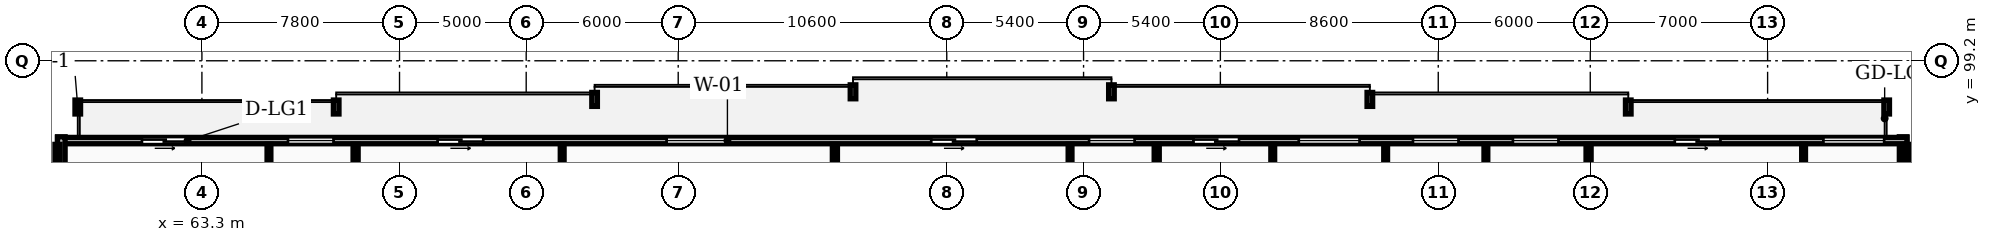
"""IFC4 building model, lengths in metres.
Left out: names, types, materials, properties, quantities, classifications, styles, units other than length and angle.
Written with IfcOpenShell. Run it as: python <this file> out.ifc"""

import sys

from ifc_helpers import new_model, si_unit, direction, frame, frame_2d, origin, place, context, subcontext, project, spatial, rectangle, extrude, element, fill, save


model = new_model("IFC4")
c1 = context("Model", 3, precision=1e-05, world=origin(), true_north=direction((0.0, 1.0)))
c2 = subcontext(c1, "Body", "Model", "MODEL_VIEW")
j1 = project(units=[si_unit("LENGTHUNIT", "METRE"), si_unit("PLANEANGLEUNIT", "RADIAN")], contexts=[c1])
p1 = place(None, origin())
s1 = spatial("IfcSite", under=j1, at=p1, CompositionType="ELEMENT")
p2 = place(p1, origin())
s2 = spatial("IfcBuilding", under=s1, at=p2, CompositionType="ELEMENT")
p3 = place(p2, frame((0.0, 0.0, 80.8)))
s3 = spatial("IfcBuildingStorey", under=s2, at=p3, CompositionType="ELEMENT", Elevation=80.8)
p4 = place(p3, frame((130.45, 92.6, 0.0), z_axis=(0.0, 0.0, 1.0), x_axis=(0.0, 1.0, 0.0)))
e1 = element("IfcWall", 1, at=p4, inside=s3, PredefinedType="STANDARD", context=c2, shape_type="SweptSolid", body=[
    extrude(rectangle(XDim=3.6, YDim=0.3, at=frame_2d((1.8, 0.0))), origin(), (0.0, 0.0, 1.0), 2.97),
])
p5 = place(p3, frame((130.6, 96.05, 0.0), z_axis=(0.0, 0.0, 1.0), x_axis=(-1.0, 0.0, 0.0)))
e2 = element("IfcWall", 2, at=p5, inside=s3, PredefinedType="STANDARD", context=c2, shape_type="SweptSolid", body=[
    extrude(rectangle(XDim=73.0, YDim=0.25, at=frame_2d((36.5, 0.0))), origin(), (0.0, 0.0, 1.0), 2.97),
])
p6 = place(p5, frame((67.867, 0.0, 0.0)))
e3 = element("IfcOpeningElement", 3, at=p6, cuts=e2, PredefinedType="OPENING", context=c2, shape_type="SweptSolid", body=[
    extrude(rectangle(XDim=1.8, YDim=2.2, at=frame_2d((0.9, 1.1))), frame((0.0, 0.135, 0.0), z_axis=(0.0, -1.0, 0.0), x_axis=(1.0, 0.0, 0.0)), (0.0, 0.0, 1.0), 0.27),
])
p7 = place(p5, frame((62.103, 0.0, 0.85)))
e4 = element("IfcOpeningElement", 4, at=p7, cuts=e2, PredefinedType="OPENING", context=c2, shape_type="SweptSolid", body=[
    extrude(rectangle(XDim=1.8, YDim=1.8, at=frame_2d((0.9, 0.9))), frame((0.0, 0.135, 0.0), z_axis=(0.0, -1.0, 0.0), x_axis=(1.0, 0.0, 0.0)), (0.0, 0.0, 1.0), 0.27),
])
p8 = place(p5, frame((56.196, 0.0, 0.0)))
e5 = element("IfcOpeningElement", 5, at=p8, cuts=e2, PredefinedType="OPENING", context=c2, shape_type="SweptSolid", body=[
    extrude(rectangle(XDim=1.8, YDim=2.2, at=frame_2d((0.9, 1.1))), frame((0.0, 0.135, 0.0), z_axis=(0.0, -1.0, 0.0), x_axis=(1.0, 0.0, 0.0)), (0.0, 0.0, 1.0), 0.27),
])
p9 = place(p5, frame((46.557, 0.0, 0.85)))
e6 = element("IfcOpeningElement", 6, at=p9, cuts=e2, PredefinedType="OPENING", context=c2, shape_type="SweptSolid", body=[
    extrude(rectangle(XDim=2.4, YDim=1.9, at=frame_2d((1.2, 0.95))), frame((0.0, 0.135, 0.0), z_axis=(0.0, -1.0, 0.0), x_axis=(1.0, 0.0, 0.0)), (0.0, 0.0, 1.0), 0.27),
])
p10 = place(p5, frame((36.714, 0.0, 0.0)))
e7 = element("IfcOpeningElement", 7, at=p10, cuts=e2, PredefinedType="OPENING", context=c2, shape_type="SweptSolid", body=[
    extrude(rectangle(XDim=1.8, YDim=2.2, at=frame_2d((0.9, 1.1))), frame((0.0, 0.135, 0.0), z_axis=(0.0, -1.0, 0.0), x_axis=(1.0, 0.0, 0.0)), (0.0, 0.0, 1.0), 0.27),
])
p11 = place(p5, frame((30.483, 0.0, 0.85)))
e8 = element("IfcOpeningElement", 8, at=p11, cuts=e2, PredefinedType="OPENING", context=c2, shape_type="SweptSolid", body=[
    extrude(rectangle(XDim=1.8, YDim=1.8, at=frame_2d((0.9, 0.9))), frame((0.0, 0.135, 0.0), z_axis=(0.0, -1.0, 0.0), x_axis=(1.0, 0.0, 0.0)), (0.0, 0.0, 1.0), 0.27),
])
p12 = place(p5, frame((21.604, 0.0, 0.85)))
e9 = element("IfcOpeningElement", 9, at=p12, cuts=e2, PredefinedType="OPENING", context=c2, shape_type="SweptSolid", body=[
    extrude(rectangle(XDim=2.4, YDim=1.9, at=frame_2d((1.2, 0.95))), frame((0.0, 0.135, 0.0), z_axis=(0.0, -1.0, 0.0), x_axis=(1.0, 0.0, 0.0)), (0.0, 0.0, 1.0), 0.27),
])
p13 = place(p5, frame((17.698, 0.0, 0.85)))
e10 = element("IfcOpeningElement", 10, at=p13, cuts=e2, PredefinedType="OPENING", context=c2, shape_type="SweptSolid", body=[
    extrude(rectangle(XDim=1.8, YDim=1.8, at=frame_2d((0.9, 0.9))), frame((0.0, 0.135, 0.0), z_axis=(0.0, -1.0, 0.0), x_axis=(1.0, 0.0, 0.0)), (0.0, 0.0, 1.0), 0.27),
])
p14 = place(p5, frame((26.363, 0.0, 0.0)))
e11 = element("IfcOpeningElement", 11, at=p14, cuts=e2, PredefinedType="OPENING", context=c2, shape_type="SweptSolid", body=[
    extrude(rectangle(XDim=1.8, YDim=2.2, at=frame_2d((0.9, 1.1))), frame((0.0, 0.135, 0.0), z_axis=(0.0, -1.0, 0.0), x_axis=(1.0, 0.0, 0.0)), (0.0, 0.0, 1.0), 0.27),
])
p15 = place(p5, frame((13.753, 0.0, 0.85)))
e12 = element("IfcOpeningElement", 12, at=p15, cuts=e2, PredefinedType="OPENING", context=c2, shape_type="SweptSolid", body=[
    extrude(rectangle(XDim=1.8, YDim=1.8, at=frame_2d((0.9, 0.9))), frame((0.0, 0.135, 0.0), z_axis=(0.0, -1.0, 0.0), x_axis=(1.0, 0.0, 0.0)), (0.0, 0.0, 1.0), 0.27),
])
p16 = place(p5, frame((7.363, 0.0, 0.0)))
e13 = element("IfcOpeningElement", 13, at=p16, cuts=e2, PredefinedType="OPENING", context=c2, shape_type="SweptSolid", body=[
    extrude(rectangle(XDim=1.8, YDim=2.2, at=frame_2d((0.9, 1.1))), frame((0.0, 0.135, 0.0), z_axis=(0.0, -1.0, 0.0), x_axis=(1.0, 0.0, 0.0)), (0.0, 0.0, 1.0), 0.27),
])
p17 = place(p5, frame((0.9, 0.0, 0.85)))
e14 = element("IfcOpeningElement", 14, at=p17, cuts=e2, PredefinedType="OPENING", context=c2, shape_type="SweptSolid", body=[
    extrude(rectangle(XDim=2.4, YDim=1.9, at=frame_2d((1.2, 0.95))), frame((0.0, 0.135, 0.0), z_axis=(0.0, -1.0, 0.0), x_axis=(1.0, 0.0, 0.0)), (0.0, 0.0, 1.0), 0.27),
])
p18 = place(p3, frame((57.75, 96.2, 0.0), z_axis=(0.0, 0.0, 1.0), x_axis=(0.0, -1.0, 0.0)))
e15 = element("IfcWall", 15, at=p18, inside=s3, PredefinedType="STANDARD", context=c2, shape_type="SweptSolid", body=[
    extrude(rectangle(XDim=3.6, YDim=0.3, at=frame_2d((1.8, 0.0))), origin(), (0.0, 0.0, 1.0), 2.97),
])
for number, where, z_axis, x_axis in (
    (16, (57.6, 69.43, 0.0), (0.0, 0.0, 1.0), (0.0, 1.0, 0.0)),
    (17, (130.6, 69.43, 0.0), (0.0, 0.0, 1.0), (0.0, 1.0, 0.0)),
    (18, (69.367, 69.43, 0.0), (0.0, 0.0, 1.0), (0.0, 1.0, 0.0)),
):
    element("IfcWall", number, at=place(p3, frame(where, z_axis=z_axis, x_axis=x_axis)), inside=s3, PredefinedType="PARTITIONING", context=c2, shape_type="SweptSolid", body=[
        extrude(rectangle(XDim=26.47, YDim=0.2, at=frame_2d((13.235, 0.0))), origin(), (0.0, 0.0, 1.0), 2.97),
    ])
p19 = place(p3, frame((65.947, 85.59, 0.0), z_axis=(0.0, 0.0, 1.0), x_axis=(0.0, 1.0, 0.0)))
e19 = element("IfcWall", 19, at=p19, inside=s3, PredefinedType="PARTITIONING", context=c2, shape_type="SweptSolid", body=[
    extrude(rectangle(XDim=10.31, YDim=0.15, at=frame_2d((5.155, 0.0))), origin(), (0.0, 0.0, 1.0), 2.97),
])
p20 = place(p19, frame((1.43, 0.0, 0.0)))
e20 = element("IfcOpeningElement", 20, at=p20, cuts=e19, PredefinedType="OPENING", context=c2, shape_type="SweptSolid", body=[
    extrude(rectangle(XDim=0.84, YDim=2.04, at=frame_2d((0.42, 1.02))), frame((0.0, 0.085, 0.0), z_axis=(0.0, -1.0, 0.0), x_axis=(1.0, 0.0, 0.0)), (0.0, 0.0, 1.0), 0.17),
])
p21 = place(p19, frame((3.102, 0.0, 0.0)))
e21 = element("IfcOpeningElement", 21, at=p21, cuts=e19, PredefinedType="OPENING", context=c2, shape_type="SweptSolid", body=[
    extrude(rectangle(XDim=0.84, YDim=2.04, at=frame_2d((0.42, 1.02))), frame((0.0, 0.085, 0.0), z_axis=(0.0, -1.0, 0.0), x_axis=(1.0, 0.0, 0.0)), (0.0, 0.0, 1.0), 0.17),
])
p22 = place(p19, frame((7.29, 0.0, 0.0)))
e22 = element("IfcOpeningElement", 22, at=p22, cuts=e19, PredefinedType="OPENING", context=c2, shape_type="SweptSolid", body=[
    extrude(rectangle(XDim=0.88, YDim=2.06, at=frame_2d((0.44, 1.03))), frame((0.0, 0.085, 0.0), z_axis=(0.0, -1.0, 0.0), x_axis=(1.0, 0.0, 0.0)), (0.0, 0.0, 1.0), 0.17),
])
p23 = place(p3, frame((88.285, 69.43, 0.0), z_axis=(0.0, 0.0, 1.0), x_axis=(0.0, 1.0, 0.0)))
e23 = element("IfcWall", 23, at=p23, inside=s3, PredefinedType="PARTITIONING", context=c2, shape_type="SweptSolid", body=[
    extrude(rectangle(XDim=26.47, YDim=0.2, at=frame_2d((13.235, 0.0))), origin(), (0.0, 0.0, 1.0), 2.97),
])
p24 = place(p3, frame((77.521, 90.73, 0.0), z_axis=(0.0, 0.0, 1.0), x_axis=(0.0, 1.0, 0.0)))
e24 = element("IfcWall", 24, at=p24, inside=s3, PredefinedType="PARTITIONING", context=c2, shape_type="SweptSolid", body=[
    extrude(rectangle(XDim=5.17, YDim=0.15, at=frame_2d((2.585, 0.0))), origin(), (0.0, 0.0, 1.0), 2.97),
])
p25 = place(p3, frame((100.987, 69.43, 0.0), z_axis=(0.0, 0.0, 1.0), x_axis=(0.0, 1.0, 0.0)))
e25 = element("IfcWall", 25, at=p25, inside=s3, PredefinedType="PARTITIONING", context=c2, shape_type="SweptSolid", body=[
    extrude(rectangle(XDim=26.47, YDim=0.2, at=frame_2d((13.235, 0.0))), origin(), (0.0, 0.0, 1.0), 2.97),
])
p26 = place(p3, frame((97.567, 85.59, 0.0), z_axis=(0.0, 0.0, 1.0), x_axis=(0.0, 1.0, 0.0)))
e26 = element("IfcWall", 26, at=p26, inside=s3, PredefinedType="PARTITIONING", context=c2, shape_type="SweptSolid", body=[
    extrude(rectangle(XDim=10.31, YDim=0.15, at=frame_2d((5.155, 0.0))), origin(), (0.0, 0.0, 1.0), 2.97),
])
p27 = place(p26, frame((1.43, 0.0, 0.0)))
e27 = element("IfcOpeningElement", 27, at=p27, cuts=e26, PredefinedType="OPENING", context=c2, shape_type="SweptSolid", body=[
    extrude(rectangle(XDim=0.84, YDim=2.04, at=frame_2d((0.42, 1.02))), frame((0.0, 0.085, 0.0), z_axis=(0.0, -1.0, 0.0), x_axis=(1.0, 0.0, 0.0)), (0.0, 0.0, 1.0), 0.17),
])
p28 = place(p26, frame((3.92, 0.0, 0.0)))
e28 = element("IfcOpeningElement", 28, at=p28, cuts=e26, PredefinedType="OPENING", context=c2, shape_type="SweptSolid", body=[
    extrude(rectangle(XDim=0.84, YDim=2.04, at=frame_2d((0.42, 1.02))), frame((0.0, 0.085, 0.0), z_axis=(0.0, -1.0, 0.0), x_axis=(1.0, 0.0, 0.0)), (0.0, 0.0, 1.0), 0.17),
])
p29 = place(p26, frame((5.48, 0.0, 0.0)))
e29 = element("IfcOpeningElement", 29, at=p29, cuts=e26, PredefinedType="OPENING", context=c2, shape_type="SweptSolid", body=[
    extrude(rectangle(XDim=0.88, YDim=2.06, at=frame_2d((0.44, 1.03))), frame((0.0, 0.085, 0.0), z_axis=(0.0, -1.0, 0.0), x_axis=(1.0, 0.0, 0.0)), (0.0, 0.0, 1.0), 0.17),
])
p30 = place(p3, frame((118.033, 69.43, 0.0), z_axis=(0.0, 0.0, 1.0), x_axis=(0.0, 1.0, 0.0)))
e30 = element("IfcWall", 30, at=p30, inside=s3, PredefinedType="PARTITIONING", context=c2, shape_type="SweptSolid", body=[
    extrude(rectangle(XDim=26.47, YDim=0.2, at=frame_2d((13.235, 0.0))), origin(), (0.0, 0.0, 1.0), 2.97),
])
p31 = place(p3, frame((110.024, 90.73, 0.0), z_axis=(0.0, 0.0, 1.0), x_axis=(0.0, 1.0, 0.0)))
e31 = element("IfcWall", 31, at=p31, inside=s3, PredefinedType="PARTITIONING", context=c2, shape_type="SweptSolid", body=[
    extrude(rectangle(XDim=5.17, YDim=0.15, at=frame_2d((2.585, 0.0))), origin(), (0.0, 0.0, 1.0), 2.97),
])
p32 = place(p3, frame((105.567, 85.59, 0.0), z_axis=(0.0, 0.0, 1.0), x_axis=(0.0, 1.0, 0.0)))
e32 = element("IfcWall", 32, at=p32, inside=s3, PredefinedType="PARTITIONING", context=c2, shape_type="SweptSolid", body=[
    extrude(rectangle(XDim=10.31, YDim=0.15, at=frame_2d((5.155, 0.0))), origin(), (0.0, 0.0, 1.0), 2.97),
])
p33 = place(p32, frame((3.82, 0.0, 0.0)))
e33 = element("IfcOpeningElement", 33, at=p33, cuts=e32, PredefinedType="OPENING", context=c2, shape_type="SweptSolid", body=[
    extrude(rectangle(XDim=0.92, YDim=2.08, at=frame_2d((0.46, 1.04))), frame((0.0, 0.085, 0.0), z_axis=(0.0, -1.0, 0.0), x_axis=(1.0, 0.0, 0.0)), (0.0, 0.0, 1.0), 0.17),
])
p34 = place(p3, frame((113.98, 88.21, 0.0), z_axis=(0.0, 0.0, 1.0), x_axis=(0.0, 1.0, 0.0)))
e34 = element("IfcWall", 34, at=p34, inside=s3, PredefinedType="PARTITIONING", context=c2, shape_type="SweptSolid", body=[
    extrude(rectangle(XDim=7.69, YDim=0.15, at=frame_2d((3.845, 0.0))), origin(), (0.0, 0.0, 1.0), 2.97),
])
p35 = place(p34, frame((0.41, 0.0, 0.0)))
e35 = element("IfcOpeningElement", 35, at=p35, cuts=e34, PredefinedType="OPENING", context=c2, shape_type="SweptSolid", body=[
    extrude(rectangle(XDim=0.92, YDim=2.08, at=frame_2d((0.46, 1.04))), frame((0.0, 0.085, 0.0), z_axis=(0.0, -1.0, 0.0), x_axis=(1.0, 0.0, 0.0)), (0.0, 0.0, 1.0), 0.17),
])
p36 = place(p3, frame((126.52, 85.59, 0.0), z_axis=(0.0, 0.0, 1.0), x_axis=(0.0, 1.0, 0.0)))
e36 = element("IfcWall", 36, at=p36, inside=s3, PredefinedType="PARTITIONING", context=c2, shape_type="SweptSolid", body=[
    extrude(rectangle(XDim=10.31, YDim=0.15, at=frame_2d((5.155, 0.0))), origin(), (0.0, 0.0, 1.0), 2.97),
])
p37 = place(p36, frame((1.43, 0.0, 0.0)))
e37 = element("IfcOpeningElement", 37, at=p37, cuts=e36, PredefinedType="OPENING", context=c2, shape_type="SweptSolid", body=[
    extrude(rectangle(XDim=0.84, YDim=2.04, at=frame_2d((0.42, 1.02))), frame((0.0, 0.085, 0.0), z_axis=(0.0, -1.0, 0.0), x_axis=(1.0, 0.0, 0.0)), (0.0, 0.0, 1.0), 0.17),
])
p38 = place(p36, frame((3.102, 0.0, 0.0)))
e38 = element("IfcOpeningElement", 38, at=p38, cuts=e36, PredefinedType="OPENING", context=c2, shape_type="SweptSolid", body=[
    extrude(rectangle(XDim=0.84, YDim=2.04, at=frame_2d((0.42, 1.02))), frame((0.0, 0.085, 0.0), z_axis=(0.0, -1.0, 0.0), x_axis=(1.0, 0.0, 0.0)), (0.0, 0.0, 1.0), 0.17),
])
p39 = place(p36, frame((7.29, 0.0, 0.0)))
e39 = element("IfcOpeningElement", 39, at=p39, cuts=e36, PredefinedType="OPENING", context=c2, shape_type="SweptSolid", body=[
    extrude(rectangle(XDim=0.88, YDim=2.06, at=frame_2d((0.44, 1.03))), frame((0.0, 0.085, 0.0), z_axis=(0.0, -1.0, 0.0), x_axis=(1.0, 0.0, 0.0)), (0.0, 0.0, 1.0), 0.17),
])
p40 = place(p6, origin())
e40 = element("IfcDoor", 40, at=p40, inside=s3, OperationType="SLIDING_TO_LEFT", PredefinedType="DOOR", context=c2, shape_type="SweptSolid", body=[
    extrude(rectangle(XDim=1.8, YDim=2.2, at=frame_2d((0.9, 1.1))), frame((0.0, 0.025, 0.0), z_axis=(0.0, -1.0, 0.0), x_axis=(1.0, 0.0, 0.0)), (0.0, 0.0, 1.0), 0.05),
])
fill(e3, e40)
p41 = place(p7, origin())
e41 = element("IfcWindow", 41, at=p41, inside=s3, PartitioningType="SINGLE_PANEL", PredefinedType="WINDOW", context=c2, shape_type="SweptSolid", body=[
    extrude(rectangle(XDim=1.8, YDim=1.8, at=frame_2d((0.9, 0.9))), frame((0.0, 0.03, 0.0), z_axis=(0.0, -1.0, 0.0), x_axis=(1.0, 0.0, 0.0)), (0.0, 0.0, 1.0), 0.06),
])
fill(e4, e41)
p42 = place(p8, origin())
e42 = element("IfcDoor", 42, at=p42, inside=s3, OperationType="SLIDING_TO_LEFT", PredefinedType="DOOR", context=c2, shape_type="SweptSolid", body=[
    extrude(rectangle(XDim=1.8, YDim=2.2, at=frame_2d((0.9, 1.1))), frame((0.0, 0.025, 0.0), z_axis=(0.0, -1.0, 0.0), x_axis=(1.0, 0.0, 0.0)), (0.0, 0.0, 1.0), 0.05),
])
fill(e5, e42)
p43 = place(p9, origin())
e43 = element("IfcWindow", 43, at=p43, inside=s3, PartitioningType="DOUBLE_PANEL_VERTICAL", PredefinedType="WINDOW", context=c2, shape_type="SweptSolid", body=[
    extrude(rectangle(XDim=2.4, YDim=1.9, at=frame_2d((1.2, 0.95))), frame((0.0, 0.03, 0.0), z_axis=(0.0, -1.0, 0.0), x_axis=(1.0, 0.0, 0.0)), (0.0, 0.0, 1.0), 0.06),
])
fill(e6, e43)
p44 = place(p10, origin())
e44 = element("IfcDoor", 44, at=p44, inside=s3, OperationType="SLIDING_TO_LEFT", PredefinedType="DOOR", context=c2, shape_type="SweptSolid", body=[
    extrude(rectangle(XDim=1.8, YDim=2.2, at=frame_2d((0.9, 1.1))), frame((0.0, 0.025, 0.0), z_axis=(0.0, -1.0, 0.0), x_axis=(1.0, 0.0, 0.0)), (0.0, 0.0, 1.0), 0.05),
])
fill(e7, e44)
p45 = place(p11, origin())
e45 = element("IfcWindow", 45, at=p45, inside=s3, PartitioningType="SINGLE_PANEL", PredefinedType="WINDOW", context=c2, shape_type="SweptSolid", body=[
    extrude(rectangle(XDim=1.8, YDim=1.8, at=frame_2d((0.9, 0.9))), frame((0.0, 0.03, 0.0), z_axis=(0.0, -1.0, 0.0), x_axis=(1.0, 0.0, 0.0)), (0.0, 0.0, 1.0), 0.06),
])
fill(e8, e45)
p46 = place(p12, origin())
e46 = element("IfcWindow", 46, at=p46, inside=s3, PartitioningType="DOUBLE_PANEL_VERTICAL", PredefinedType="WINDOW", context=c2, shape_type="SweptSolid", body=[
    extrude(rectangle(XDim=2.4, YDim=1.9, at=frame_2d((1.2, 0.95))), frame((0.0, 0.03, 0.0), z_axis=(0.0, -1.0, 0.0), x_axis=(1.0, 0.0, 0.0)), (0.0, 0.0, 1.0), 0.06),
])
fill(e9, e46)
p47 = place(p13, origin())
e47 = element("IfcWindow", 47, at=p47, inside=s3, PartitioningType="SINGLE_PANEL", PredefinedType="WINDOW", context=c2, shape_type="SweptSolid", body=[
    extrude(rectangle(XDim=1.8, YDim=1.8, at=frame_2d((0.9, 0.9))), frame((0.0, 0.03, 0.0), z_axis=(0.0, -1.0, 0.0), x_axis=(1.0, 0.0, 0.0)), (0.0, 0.0, 1.0), 0.06),
])
fill(e10, e47)
p48 = place(p14, origin())
e48 = element("IfcDoor", 48, at=p48, inside=s3, OperationType="SLIDING_TO_LEFT", PredefinedType="DOOR", context=c2, shape_type="SweptSolid", body=[
    extrude(rectangle(XDim=1.8, YDim=2.2, at=frame_2d((0.9, 1.1))), frame((0.0, 0.025, 0.0), z_axis=(0.0, -1.0, 0.0), x_axis=(1.0, 0.0, 0.0)), (0.0, 0.0, 1.0), 0.05),
])
fill(e11, e48)
p49 = place(p15, origin())
e49 = element("IfcWindow", 49, at=p49, inside=s3, PartitioningType="SINGLE_PANEL", PredefinedType="WINDOW", context=c2, shape_type="SweptSolid", body=[
    extrude(rectangle(XDim=1.8, YDim=1.8, at=frame_2d((0.9, 0.9))), frame((0.0, 0.03, 0.0), z_axis=(0.0, -1.0, 0.0), x_axis=(1.0, 0.0, 0.0)), (0.0, 0.0, 1.0), 0.06),
])
fill(e12, e49)
p50 = place(p16, origin())
e50 = element("IfcDoor", 50, at=p50, inside=s3, OperationType="SLIDING_TO_LEFT", PredefinedType="DOOR", context=c2, shape_type="SweptSolid", body=[
    extrude(rectangle(XDim=1.8, YDim=2.2, at=frame_2d((0.9, 1.1))), frame((0.0, 0.025, 0.0), z_axis=(0.0, -1.0, 0.0), x_axis=(1.0, 0.0, 0.0)), (0.0, 0.0, 1.0), 0.05),
])
fill(e13, e50)
p51 = place(p17, origin())
e51 = element("IfcWindow", 51, at=p51, inside=s3, PartitioningType="DOUBLE_PANEL_VERTICAL", PredefinedType="WINDOW", context=c2, shape_type="SweptSolid", body=[
    extrude(rectangle(XDim=2.4, YDim=1.9, at=frame_2d((1.2, 0.95))), frame((0.0, 0.03, 0.0), z_axis=(0.0, -1.0, 0.0), x_axis=(1.0, 0.0, 0.0)), (0.0, 0.0, 1.0), 0.06),
])
fill(e14, e51)
save(model, sys.argv[1])
